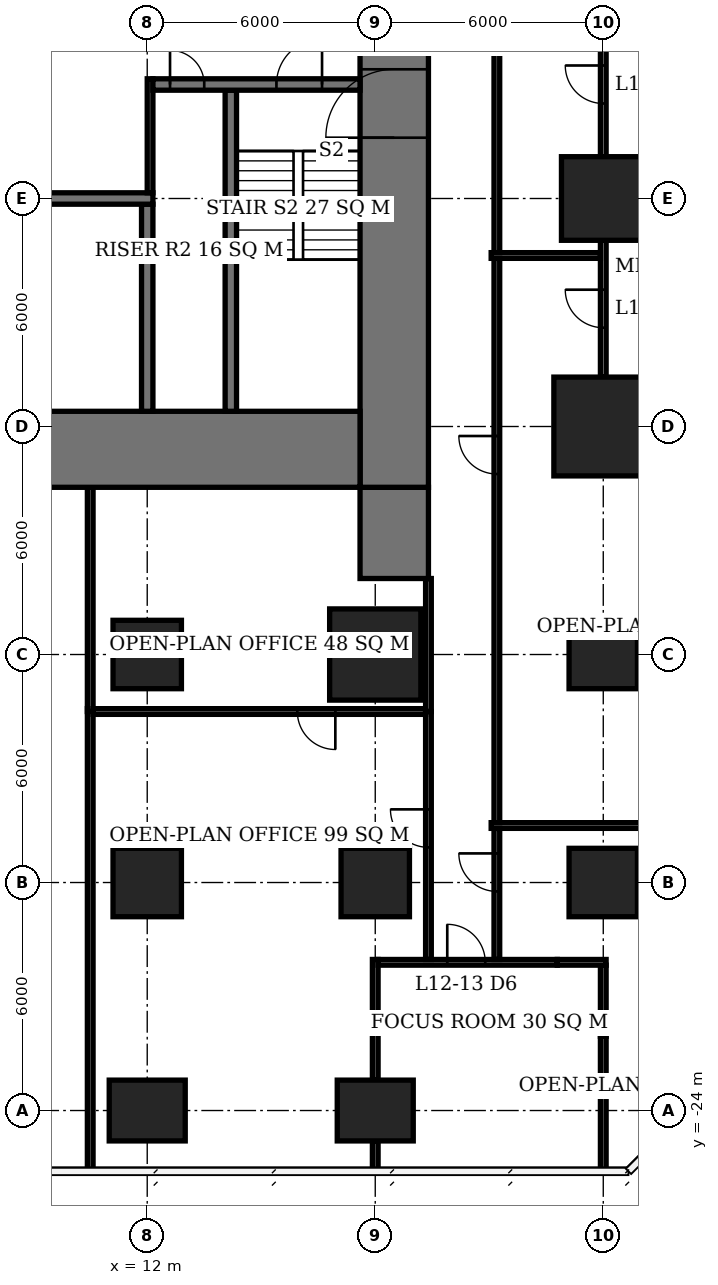
"""IFC4 building model, lengths in metres.
Left out: names, types, materials, properties, quantities, classifications, styles, units other than length and angle.
Written with IfcOpenShell. Run it as: python <this file> out.ifc"""

import sys

from ifc_helpers import new_model, si_unit, direction, frame, frame_2d, origin, origin_2d, place, context, subcontext, project, spatial, rectangle, extrude, element, fill, save


model = new_model("IFC4")
c1 = context("Model", 3, precision=1e-05, world=origin(), true_north=direction((0.0, 1.0)))
c2 = subcontext(c1, "Body", "Model", "MODEL_VIEW")
j1 = project(units=[si_unit("LENGTHUNIT", "METRE"), si_unit("PLANEANGLEUNIT", "RADIAN")], contexts=[c1])
p1 = place(None, origin())
s1 = spatial("IfcSite", under=j1, at=p1, CompositionType="ELEMENT")
p2 = place(p1, origin())
s2 = spatial("IfcBuilding", under=s1, at=p2, CompositionType="ELEMENT")
p3 = place(p2, frame((0.0, 0.0, 53.3)))
s3 = spatial("IfcBuildingStorey", under=s2, at=p3, CompositionType="ELEMENT", Elevation=53.3)
p4 = place(p3, frame((12.0, -24.0, 0.0), z_axis=(0.0, 0.0, 1.0), x_axis=(1.0, 0.0, 0.0)))
e1 = element("IfcColumn", 1, at=p4, inside=s3, PredefinedType="COLUMN", context=c2, shape_type="SweptSolid", body=[
    extrude(rectangle(XDim=2.0, YDim=1.6, at=origin_2d()), origin(), (0.0, 0.0, 1.0), 3.9),
])
for number, where, z_axis, x_axis in (
    (2, (12.0, -18.0, 0.0), (0.0, 0.0, 1.0), (1.0, 0.0, 0.0)),
    (3, (12.0, -12.0, 0.0), (0.0, 0.0, 1.0), (1.0, 0.0, 0.0)),
):
    element("IfcColumn", number, at=place(p3, frame(where, z_axis=z_axis, x_axis=x_axis)), inside=s3, PredefinedType="COLUMN", context=c2, shape_type="SweptSolid", body=[
        extrude(rectangle(XDim=1.8, YDim=1.8, at=origin_2d()), origin(), (0.0, 0.0, 1.0), 3.9),
    ])
p5 = place(p3, frame((18.0, -24.0, 0.0), z_axis=(0.0, 0.0, 1.0), x_axis=(1.0, 0.0, 0.0)))
e4 = element("IfcColumn", 4, at=p5, inside=s3, PredefinedType="COLUMN", context=c2, shape_type="SweptSolid", body=[
    extrude(rectangle(XDim=2.0, YDim=1.6, at=origin_2d()), origin(), (0.0, 0.0, 1.0), 3.9),
])
p6 = place(p3, frame((18.0, -18.0, 0.0), z_axis=(0.0, 0.0, 1.0), x_axis=(1.0, 0.0, 0.0)))
e5 = element("IfcColumn", 5, at=p6, inside=s3, PredefinedType="COLUMN", context=c2, shape_type="SweptSolid", body=[
    extrude(rectangle(XDim=1.8, YDim=1.8, at=origin_2d()), origin(), (0.0, 0.0, 1.0), 3.9),
])
p7 = place(p3, frame((18.0, -12.0, 0.0), z_axis=(0.0, 0.0, 1.0), x_axis=(1.0, 0.0, 0.0)))
e6 = element("IfcColumn", 6, at=p7, inside=s3, PredefinedType="COLUMN", context=c2, shape_type="SweptSolid", body=[
    extrude(rectangle(XDim=2.4, YDim=2.4, at=origin_2d()), origin(), (0.0, 0.0, 1.0), 3.9),
])
for number, where, z_axis, x_axis in (
    (7, (24.0, -18.0, 0.0), (0.0, 0.0, 1.0), (1.0, 0.0, 0.0)),
    (8, (24.0, -12.0, 0.0), (0.0, 0.0, 1.0), (1.0, 0.0, 0.0)),
):
    element("IfcColumn", number, at=place(p3, frame(where, z_axis=z_axis, x_axis=x_axis)), inside=s3, PredefinedType="COLUMN", context=c2, shape_type="SweptSolid", body=[
        extrude(rectangle(XDim=1.8, YDim=1.8, at=origin_2d()), origin(), (0.0, 0.0, 1.0), 3.9),
    ])
p8 = place(p3, frame((24.0, -6.0, 0.0), z_axis=(0.0, 0.0, 1.0), x_axis=(1.0, 0.0, 0.0)))
e9 = element("IfcColumn", 9, at=p8, inside=s3, PredefinedType="COLUMN", context=c2, shape_type="SweptSolid", body=[
    extrude(rectangle(XDim=2.6, YDim=2.6, at=origin_2d()), origin(), (0.0, 0.0, 1.0), 3.9),
])
p9 = place(p3, frame((24.0, 0.0, 0.0), z_axis=(0.0, 0.0, 1.0), x_axis=(1.0, 0.0, 0.0)))
e10 = element("IfcColumn", 10, at=p9, inside=s3, PredefinedType="COLUMN", context=c2, shape_type="SweptSolid", body=[
    extrude(rectangle(XDim=2.2, YDim=2.2, at=origin_2d()), origin(), (0.0, 0.0, 1.0), 3.9),
])
p10 = place(p3, frame((-5.6, -6.6, 0.0), z_axis=(0.0, 0.0, 1.0), x_axis=(1.0, 0.0, 0.0)))
e11 = element("IfcWall", 11, at=p10, inside=s3, PredefinedType="SHEAR", context=c2, shape_type="SweptSolid", body=[
    extrude(rectangle(XDim=23.2, YDim=2.0, at=frame_2d((11.6, 0.0))), origin(), (0.0, 0.0, 1.0), 3.9),
])
p11 = place(p3, frame((18.5, -7.6, 0.0), z_axis=(0.0, 0.0, 1.0), x_axis=(0.0, 1.0, 0.0)))
e12 = element("IfcWall", 12, at=p11, inside=s3, PredefinedType="SHEAR", context=c2, shape_type="SweptSolid", body=[
    extrude(rectangle(XDim=21.2, YDim=1.8, at=frame_2d((10.6, 0.0))), origin(), (0.0, 0.0, 1.0), 3.9),
])
p12 = place(p11, frame((9.2, 0.0, 0.0)))
e13 = element("IfcOpeningElement", 13, at=p12, cuts=e12, PredefinedType="OPENING", context=c2, shape_type="SweptSolid", body=[
    extrude(rectangle(XDim=1.8, YDim=2.4, at=frame_2d((0.9, 1.2))), frame((0.0, 0.91, 0.0), z_axis=(0.0, -1.0, 0.0), x_axis=(1.0, 0.0, 0.0)), (0.0, 0.0, 1.0), 1.82),
])
p13 = place(p3, frame((18.5, -10.0, 0.0), z_axis=(0.0, 0.0, 1.0), x_axis=(0.0, 1.0, 0.0)))
e14 = element("IfcWall", 14, at=p13, inside=s3, PredefinedType="SHEAR", context=c2, shape_type="SweptSolid", body=[
    extrude(rectangle(XDim=2.4, YDim=1.8, at=frame_2d((1.2, 0.0))), origin(), (0.0, 0.0, 1.0), 3.9),
])
p14 = place(p3, frame((-5.6, 0.0, 0.0), z_axis=(0.0, 0.0, 1.0), x_axis=(1.0, 0.0, 0.0)))
e15 = element("IfcWall", 15, at=p14, inside=s3, PredefinedType="SHEAR", context=c2, shape_type="SweptSolid", body=[
    extrude(rectangle(XDim=17.75, YDim=0.3, at=frame_2d((8.875, 0.0))), origin(), (0.0, 0.0, 1.0), 3.9),
])
p15 = place(p14, frame((0.6, 0.0, 0.0)))
e16 = element("IfcOpeningElement", 16, at=p15, cuts=e15, PredefinedType="OPENING", context=c2, shape_type="SweptSolid", body=[
    extrude(rectangle(XDim=0.9, YDim=2.1, at=frame_2d((0.45, 1.05))), frame((0.0, 0.16, 0.0), z_axis=(0.0, -1.0, 0.0), x_axis=(1.0, 0.0, 0.0)), (0.0, 0.0, 1.0), 0.32),
])
p16 = place(p14, frame((3.7, 0.0, 0.0)))
e17 = element("IfcOpeningElement", 17, at=p16, cuts=e15, PredefinedType="OPENING", context=c2, shape_type="SweptSolid", body=[
    extrude(rectangle(XDim=1.0, YDim=2.1, at=frame_2d((0.5, 1.05))), frame((0.0, 0.16, 0.0), z_axis=(0.0, -1.0, 0.0), x_axis=(1.0, 0.0, 0.0)), (0.0, 0.0, 1.0), 0.32),
])
p17 = place(p3, frame((12.15, 3.0, 0.0), z_axis=(0.0, 0.0, 1.0), x_axis=(1.0, 0.0, 0.0)))
e18 = element("IfcWall", 18, at=p17, inside=s3, PredefinedType="SHEAR", context=c2, shape_type="SweptSolid", body=[
    extrude(rectangle(XDim=5.45, YDim=0.3, at=frame_2d((2.725, 0.0))), origin(), (0.0, 0.0, 1.0), 3.9),
])
p18 = place(p17, frame((3.25, 0.0, 0.0)))
e19 = element("IfcOpeningElement", 19, at=p18, cuts=e18, PredefinedType="OPENING", context=c2, shape_type="SweptSolid", body=[
    extrude(rectangle(XDim=1.2, YDim=2.1, at=frame_2d((0.6, 1.05))), frame((0.0, 0.16, 0.0), z_axis=(0.0, -1.0, 0.0), x_axis=(1.0, 0.0, 0.0)), (0.0, 0.0, 1.0), 0.32),
])
p19 = place(p17, frame((0.45, 0.0, 0.0)))
e20 = element("IfcOpeningElement", 20, at=p19, cuts=e18, PredefinedType="OPENING", context=c2, shape_type="SweptSolid", body=[
    extrude(rectangle(XDim=0.9, YDim=2.1, at=frame_2d((0.45, 1.05))), frame((0.0, 0.16, 0.0), z_axis=(0.0, -1.0, 0.0), x_axis=(1.0, 0.0, 0.0)), (0.0, 0.0, 1.0), 0.32),
])
p20 = place(p3, frame((12.0, -5.6, 0.0), z_axis=(0.0, 0.0, 1.0), x_axis=(0.0, 1.0, 0.0)))
e21 = element("IfcWall", 21, at=p20, inside=s3, PredefinedType="SHEAR", context=c2, shape_type="SweptSolid", body=[
    extrude(rectangle(XDim=5.45, YDim=0.3, at=frame_2d((2.725, 0.0))), origin(), (0.0, 0.0, 1.0), 3.9),
])
p21 = place(p3, frame((14.2, -5.6, 0.0), z_axis=(0.0, 0.0, 1.0), x_axis=(0.0, 1.0, 0.0)))
e22 = element("IfcWall", 22, at=p21, inside=s3, PredefinedType="SHEAR", context=c2, shape_type="SweptSolid", body=[
    extrude(rectangle(XDim=8.45, YDim=0.3, at=frame_2d((4.225, 0.0))), origin(), (0.0, 0.0, 1.0), 3.9),
])
p22 = place(p3, frame((18.075, -20.1, 0.0), z_axis=(0.0, 0.0, 1.0), x_axis=(1.0, 0.0, 0.0)))
e23 = element("IfcWall", 23, at=p22, inside=s3, PredefinedType="PARTITIONING", context=c2, shape_type="SweptSolid", body=[
    extrude(rectangle(XDim=4.715, YDim=0.15, at=frame_2d((2.357, 0.0))), origin(), (0.0, 0.0, 1.0), 3.65),
])
p23 = place(p22, frame((1.82, 0.0, 0.0)))
e24 = element("IfcOpeningElement", 24, at=p23, cuts=e23, PredefinedType="OPENING", context=c2, shape_type="SweptSolid", body=[
    extrude(rectangle(XDim=1.0, YDim=2.1, at=frame_2d((0.5, 1.05))), frame((0.0, 0.085, 0.0), z_axis=(0.0, -1.0, 0.0), x_axis=(1.0, 0.0, 0.0)), (0.0, 0.0, 1.0), 0.17),
])
p24 = place(p3, frame((22.79, -20.1, 0.0), z_axis=(0.0, 0.0, 1.0), x_axis=(1.0, 0.0, 0.0)))
e25 = element("IfcWall", 25, at=p24, inside=s3, PredefinedType="PARTITIONING", context=c2, shape_type="SweptSolid", body=[
    extrude(rectangle(XDim=1.285, YDim=0.15, at=frame_2d((0.643, 0.0))), origin(), (0.0, 0.0, 1.0), 2.65),
])
p25 = place(p3, frame((18.0, -25.6, 0.0), z_axis=(0.0, 0.0, 1.0), x_axis=(0.0, 1.0, 0.0)))
e26 = element("IfcWall", 26, at=p25, inside=s3, PredefinedType="PARTITIONING", context=c2, shape_type="SweptSolid", body=[
    extrude(rectangle(XDim=0.8, YDim=0.15, at=frame_2d((0.4, 0.0))), origin(), (0.0, 0.0, 1.0), 3.65),
])
p26 = place(p3, frame((18.0, -23.2, 0.0), z_axis=(0.0, 0.0, 1.0), x_axis=(0.0, 1.0, 0.0)))
e27 = element("IfcWall", 27, at=p26, inside=s3, PredefinedType="PARTITIONING", context=c2, shape_type="SweptSolid", body=[
    extrude(rectangle(XDim=3.175, YDim=0.15, at=frame_2d((1.587, 0.0))), origin(), (0.0, 0.0, 1.0), 3.65),
])
p27 = place(p3, frame((24.0, -25.6, 0.0), z_axis=(0.0, 0.0, 1.0), x_axis=(0.0, 1.0, 0.0)))
e28 = element("IfcWall", 28, at=p27, inside=s3, PredefinedType="PARTITIONING", context=c2, shape_type="SweptSolid", body=[
    extrude(rectangle(XDim=3.555, YDim=0.15, at=frame_2d((1.778, 0.0))), origin(), (0.0, 0.0, 1.0), 3.65),
])
p28 = place(p3, frame((24.0, -22.045, 0.0), z_axis=(0.0, 0.0, 1.0), x_axis=(0.0, 1.0, 0.0)))
e29 = element("IfcWall", 29, at=p28, inside=s3, PredefinedType="PARTITIONING", context=c2, shape_type="SweptSolid", body=[
    extrude(rectangle(XDim=1.87, YDim=0.15, at=frame_2d((0.935, 0.0))), origin(), (0.0, 0.0, 1.0), 2.65),
])
p29 = place(p3, frame((24.0, -4.7, 0.0), z_axis=(0.0, 0.0, 1.0), x_axis=(0.0, 1.0, 0.0)))
e30 = element("IfcWall", 30, at=p29, inside=s3, PredefinedType="PARTITIONING", context=c2, shape_type="SweptSolid", body=[
    extrude(rectangle(XDim=3.6, YDim=0.15, at=frame_2d((1.8, 0.0))), origin(), (0.0, 0.0, 1.0), 3.65),
])
p30 = place(p29, frame((1.3, 0.0, 0.0)))
e31 = element("IfcOpeningElement", 31, at=p30, cuts=e30, PredefinedType="OPENING", context=c2, shape_type="SweptSolid", body=[
    extrude(rectangle(XDim=1.0, YDim=2.1, at=frame_2d((0.5, 1.05))), frame((0.0, 0.085, 0.0), z_axis=(0.0, -1.0, 0.0), x_axis=(1.0, 0.0, 0.0)), (0.0, 0.0, 1.0), 0.17),
])
p31 = place(p3, frame((24.0, 1.1, 0.0), z_axis=(0.0, 0.0, 1.0), x_axis=(0.0, 1.0, 0.0)))
e32 = element("IfcWall", 32, at=p31, inside=s3, PredefinedType="PARTITIONING", context=c2, shape_type="SweptSolid", body=[
    extrude(rectangle(XDim=3.8, YDim=0.15, at=frame_2d((1.9, 0.0))), origin(), (0.0, 0.0, 1.0), 3.65),
])
p32 = place(p31, frame((1.4, 0.0, 0.0)))
e33 = element("IfcOpeningElement", 33, at=p32, cuts=e32, PredefinedType="OPENING", context=c2, shape_type="SweptSolid", body=[
    extrude(rectangle(XDim=1.0, YDim=2.1, at=frame_2d((0.5, 1.05))), frame((0.0, 0.085, 0.0), z_axis=(0.0, -1.0, 0.0), x_axis=(1.0, 0.0, 0.0)), (0.0, 0.0, 1.0), 0.17),
])
p33 = place(p3, frame((10.5, -25.6, 0.0), z_axis=(0.0, 0.0, 1.0), x_axis=(0.0, 1.0, 0.0)))
e34 = element("IfcWall", 34, at=p33, inside=s3, PredefinedType="PARTITIONING", context=c2, shape_type="SweptSolid", body=[
    extrude(rectangle(XDim=12.175, YDim=0.15, at=frame_2d((6.087, 0.0))), origin(), (0.0, 0.0, 1.0), 3.65),
])
p34 = place(p3, frame((10.5, -13.5, 0.0), z_axis=(0.0, 0.0, 1.0), x_axis=(0.0, 1.0, 0.0)))
e35 = element("IfcWall", 35, at=p34, inside=s3, PredefinedType="PARTITIONING", context=c2, shape_type="SweptSolid", body=[
    extrude(rectangle(XDim=5.9, YDim=0.15, at=frame_2d((2.95, 0.0))), origin(), (0.0, 0.0, 1.0), 3.65),
])
p35 = place(p3, frame((19.325, -13.5, 0.0), z_axis=(0.0, 0.0, 1.0), x_axis=(-1.0, 0.0, 0.0)))
e36 = element("IfcWall", 36, at=p35, inside=s3, PredefinedType="PARTITIONING", context=c2, shape_type="SweptSolid", body=[
    extrude(rectangle(XDim=8.75, YDim=0.15, at=frame_2d((4.375, 0.0))), origin(), (0.0, 0.0, 1.0), 3.65),
])
p36 = place(p35, frame((2.375, 0.0, 0.0)))
e37 = element("IfcOpeningElement", 37, at=p36, cuts=e36, PredefinedType="OPENING", context=c2, shape_type="SweptSolid", body=[
    extrude(rectangle(XDim=1.0, YDim=2.1, at=frame_2d((0.5, 1.05))), frame((0.0, 0.085, 0.0), z_axis=(0.0, -1.0, 0.0), x_axis=(1.0, 0.0, 0.0)), (0.0, 0.0, 1.0), 0.17),
])
p37 = place(p3, frame((19.4, -20.025, 0.0), z_axis=(0.0, 0.0, 1.0), x_axis=(0.0, 1.0, 0.0)))
e38 = element("IfcWall", 38, at=p37, inside=s3, PredefinedType="PARTITIONING", context=c2, shape_type="SweptSolid", body=[
    extrude(rectangle(XDim=6.525, YDim=0.15, at=frame_2d((3.262, 0.0))), origin(), (0.0, 0.0, 1.0), 3.65),
])
p38 = place(p37, frame((2.95, 0.0, 0.0)))
e39 = element("IfcOpeningElement", 39, at=p38, cuts=e38, PredefinedType="OPENING", context=c2, shape_type="SweptSolid", body=[
    extrude(rectangle(XDim=1.0, YDim=2.1, at=frame_2d((0.5, 1.05))), frame((0.0, 0.085, 0.0), z_axis=(0.0, -1.0, 0.0), x_axis=(1.0, 0.0, 0.0)), (0.0, 0.0, 1.0), 0.17),
])
p39 = place(p3, frame((19.4, -13.5, 0.0), z_axis=(0.0, 0.0, 1.0), x_axis=(0.0, 1.0, 0.0)))
e40 = element("IfcWall", 40, at=p39, inside=s3, PredefinedType="PARTITIONING", context=c2, shape_type="SweptSolid", body=[
    extrude(rectangle(XDim=3.5, YDim=0.15, at=frame_2d((1.75, 0.0))), origin(), (0.0, 0.0, 1.0), 3.65),
])
p40 = place(p3, frame((21.2, -20.025, 0.0), z_axis=(0.0, 0.0, 1.0), x_axis=(0.0, 1.0, 0.0)))
e41 = element("IfcWall", 41, at=p40, inside=s3, PredefinedType="PARTITIONING", context=c2, shape_type="SweptSolid", body=[
    extrude(rectangle(XDim=3.45, YDim=0.15, at=frame_2d((1.725, 0.0))), origin(), (0.0, 0.0, 1.0), 3.65),
])
p41 = place(p40, frame((1.791, 0.0, 0.0)))
e42 = element("IfcOpeningElement", 42, at=p41, cuts=e41, PredefinedType="OPENING", context=c2, shape_type="SweptSolid", body=[
    extrude(rectangle(XDim=1.0, YDim=2.1, at=frame_2d((0.5, 1.05))), frame((0.0, 0.085, 0.0), z_axis=(0.0, -1.0, 0.0), x_axis=(1.0, 0.0, 0.0)), (0.0, 0.0, 1.0), 0.17),
])
p42 = place(p3, frame((21.2, -16.425, 0.0), z_axis=(0.0, 0.0, 1.0), x_axis=(0.0, 1.0, 0.0)))
e43 = element("IfcWall", 43, at=p42, inside=s3, PredefinedType="PARTITIONING", context=c2, shape_type="SweptSolid", body=[
    extrude(rectangle(XDim=14.85, YDim=0.15, at=frame_2d((7.425, 0.0))), origin(), (0.0, 0.0, 1.0), 3.65),
])
p43 = place(p42, frame((9.175, 0.0, 0.0)))
e44 = element("IfcOpeningElement", 44, at=p43, cuts=e43, PredefinedType="OPENING", context=c2, shape_type="SweptSolid", body=[
    extrude(rectangle(XDim=1.0, YDim=2.1, at=frame_2d((0.5, 1.05))), frame((0.0, 0.085, 0.0), z_axis=(0.0, -1.0, 0.0), x_axis=(1.0, 0.0, 0.0)), (0.0, 0.0, 1.0), 0.17),
])
p44 = place(p3, frame((21.05, -16.5, 0.0), z_axis=(0.0, 0.0, 1.0), x_axis=(1.0, 0.0, 0.0)))
e45 = element("IfcWall", 45, at=p44, inside=s3, PredefinedType="PARTITIONING", context=c2, shape_type="SweptSolid", body=[
    extrude(rectangle(XDim=6.54, YDim=0.15, at=frame_2d((3.27, 0.0))), origin(), (0.0, 0.0, 1.0), 3.65),
])
p45 = place(p3, frame((21.2, -1.425, 0.0), z_axis=(0.0, 0.0, 1.0), x_axis=(0.0, 1.0, 0.0)))
e46 = element("IfcWall", 46, at=p45, inside=s3, PredefinedType="PARTITIONING", context=c2, shape_type="SweptSolid", body=[
    extrude(rectangle(XDim=17.85, YDim=0.15, at=frame_2d((8.925, 0.0))), origin(), (0.0, 0.0, 1.0), 3.65),
])
p46 = place(p45, frame((11.125, 0.0, 0.0)))
e47 = element("IfcOpeningElement", 47, at=p46, cuts=e46, PredefinedType="OPENING", context=c2, shape_type="SweptSolid", body=[
    extrude(rectangle(XDim=1.0, YDim=2.1, at=frame_2d((0.5, 1.05))), frame((0.0, 0.085, 0.0), z_axis=(0.0, -1.0, 0.0), x_axis=(1.0, 0.0, 0.0)), (0.0, 0.0, 1.0), 0.17),
])
p47 = place(p3, frame((21.05, -1.5, 0.0), z_axis=(0.0, 0.0, 1.0), x_axis=(1.0, 0.0, 0.0)))
e48 = element("IfcWall", 48, at=p47, inside=s3, PredefinedType="PARTITIONING", context=c2, shape_type="SweptSolid", body=[
    extrude(rectangle(XDim=2.875, YDim=0.15, at=frame_2d((1.438, 0.0))), origin(), (0.0, 0.0, 1.0), 3.65),
])
p48 = place(p3, frame((12.075, 0.15, 0.0), z_axis=(0.0, 0.0, 1.0), x_axis=(0.0, 1.0, 0.0)))
e49 = element("IfcWall", 49, at=p48, inside=s3, PredefinedType="PARTITIONING", context=c2, shape_type="SweptSolid", body=[
    extrude(rectangle(XDim=3.0, YDim=0.15, at=frame_2d((1.5, 0.0))), origin(), (0.0, 0.0, 1.0), 3.65),
])
p49 = place(p12, origin())
e50 = element("IfcDoor", 50, at=p49, inside=s3, OperationType="DOUBLE_DOOR_SINGLE_SWING", PredefinedType="DOOR", context=c2, shape_type="SweptSolid", body=[
    extrude(rectangle(XDim=1.8, YDim=2.4, at=frame_2d((0.9, 1.2))), frame((0.0, 0.025, 0.0), z_axis=(0.0, -1.0, 0.0), x_axis=(1.0, 0.0, 0.0)), (0.0, 0.0, 1.0), 0.05),
])
fill(e13, e50)
p50 = place(p18, origin())
e51 = element("IfcDoor", 51, at=p50, inside=s3, OperationType="SINGLE_SWING_RIGHT", PredefinedType="DOOR", context=c2, shape_type="SweptSolid", body=[
    extrude(rectangle(XDim=1.2, YDim=2.1, at=frame_2d((0.6, 1.05))), frame((0.0, 0.025, 0.0), z_axis=(0.0, -1.0, 0.0), x_axis=(1.0, 0.0, 0.0)), (0.0, 0.0, 1.0), 0.05),
])
fill(e19, e51)
p51 = place(p19, origin())
e52 = element("IfcDoor", 52, at=p51, inside=s3, OperationType="SINGLE_SWING_LEFT", PredefinedType="DOOR", context=c2, shape_type="SweptSolid", body=[
    extrude(rectangle(XDim=0.9, YDim=2.1, at=frame_2d((0.45, 1.05))), frame((0.0, 0.025, 0.0), z_axis=(0.0, -1.0, 0.0), x_axis=(1.0, 0.0, 0.0)), (0.0, 0.0, 1.0), 0.05),
])
fill(e20, e52)
p52 = place(p23, origin())
e53 = element("IfcDoor", 53, at=p52, inside=s3, OperationType="SINGLE_SWING_LEFT", PredefinedType="DOOR", context=c2, shape_type="SweptSolid", body=[
    extrude(rectangle(XDim=1.0, YDim=2.1, at=frame_2d((0.5, 1.05))), frame((0.0, 0.025, 0.0), z_axis=(0.0, -1.0, 0.0), x_axis=(1.0, 0.0, 0.0)), (0.0, 0.0, 1.0), 0.05),
])
fill(e24, e53)
p53 = place(p30, origin())
e54 = element("IfcDoor", 54, at=p53, inside=s3, OperationType="SINGLE_SWING_RIGHT", PredefinedType="DOOR", context=c2, shape_type="SweptSolid", body=[
    extrude(rectangle(XDim=1.0, YDim=2.1, at=frame_2d((0.5, 1.05))), frame((0.0, 0.025, 0.0), z_axis=(0.0, -1.0, 0.0), x_axis=(1.0, 0.0, 0.0)), (0.0, 0.0, 1.0), 0.05),
])
fill(e31, e54)
p54 = place(p32, origin())
e55 = element("IfcDoor", 55, at=p54, inside=s3, OperationType="SINGLE_SWING_RIGHT", PredefinedType="DOOR", context=c2, shape_type="SweptSolid", body=[
    extrude(rectangle(XDim=1.0, YDim=2.1, at=frame_2d((0.5, 1.05))), frame((0.0, 0.025, 0.0), z_axis=(0.0, -1.0, 0.0), x_axis=(1.0, 0.0, 0.0)), (0.0, 0.0, 1.0), 0.05),
])
fill(e33, e55)
p55 = place(p41, origin())
e56 = element("IfcDoor", 56, at=p55, inside=s3, OperationType="SINGLE_SWING_RIGHT", PredefinedType="DOOR", context=c2, shape_type="SweptSolid", body=[
    extrude(rectangle(XDim=1.0, YDim=2.1, at=frame_2d((0.5, 1.05))), frame((0.0, 0.025, 0.0), z_axis=(0.0, -1.0, 0.0), x_axis=(1.0, 0.0, 0.0)), (0.0, 0.0, 1.0), 0.05),
])
fill(e42, e56)
p56 = place(p43, origin())
e57 = element("IfcDoor", 57, at=p56, inside=s3, OperationType="SINGLE_SWING_RIGHT", PredefinedType="DOOR", context=c2, shape_type="SweptSolid", body=[
    extrude(rectangle(XDim=1.0, YDim=2.1, at=frame_2d((0.5, 1.05))), frame((0.0, 0.025, 0.0), z_axis=(0.0, -1.0, 0.0), x_axis=(1.0, 0.0, 0.0)), (0.0, 0.0, 1.0), 0.05),
])
fill(e44, e57)
p57 = place(p38, origin())
e58 = element("IfcDoor", 58, at=p57, inside=s3, OperationType="SINGLE_SWING_RIGHT", PredefinedType="DOOR", context=c2, shape_type="SweptSolid", body=[
    extrude(rectangle(XDim=1.0, YDim=2.1, at=frame_2d((0.5, 1.05))), frame((0.0, 0.025, 0.0), z_axis=(0.0, -1.0, 0.0), x_axis=(1.0, 0.0, 0.0)), (0.0, 0.0, 1.0), 0.05),
])
fill(e39, e58)
p58 = place(p36, origin())
e59 = element("IfcDoor", 59, at=p58, inside=s3, OperationType="SINGLE_SWING_LEFT", PredefinedType="DOOR", context=c2, shape_type="SweptSolid", body=[
    extrude(rectangle(XDim=1.0, YDim=2.1, at=frame_2d((0.5, 1.05))), frame((0.0, 0.025, 0.0), z_axis=(0.0, -1.0, 0.0), x_axis=(1.0, 0.0, 0.0)), (0.0, 0.0, 1.0), 0.05),
])
fill(e37, e59)
save(model, sys.argv[1])
